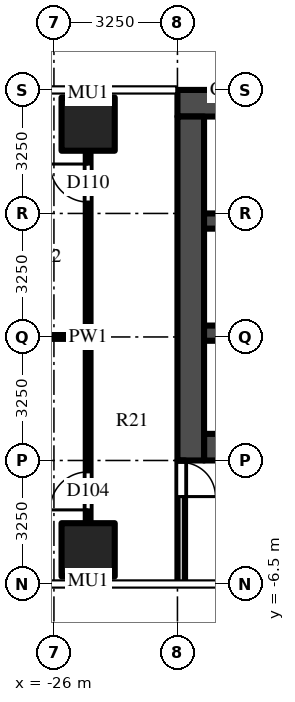
"""IFC4 building model, lengths in metres.
Left out: names, types, materials, properties, quantities, classifications, styles, units other than length and angle.
Written with IfcOpenShell. Run it as: python <this file> out.ifc"""

import sys

from ifc_helpers import new_model, si_unit, direction, frame, frame_2d, origin, origin_2d, place, context, subcontext, project, spatial, rectangle, extrude, source, transform, mapped, element, fill, save


model = new_model("IFC4")
c1 = context("Model", 3, precision=1e-05, world=origin(), true_north=direction((0.0, 1.0)))
c2 = subcontext(c1, "Body", "Model", "MODEL_VIEW")
j1 = project(units=[si_unit("LENGTHUNIT", "METRE"), si_unit("PLANEANGLEUNIT", "RADIAN")], contexts=[c1])
p1 = place(None, origin())
s1 = spatial("IfcSite", under=j1, at=p1, CompositionType="ELEMENT")
p2 = place(p1, origin())
s2 = spatial("IfcBuilding", under=s1, at=p2, CompositionType="ELEMENT")
p3 = place(p2, frame((0.0, 0.0, 61.0)))
s3 = spatial("IfcBuildingStorey", under=s2, at=p3, CompositionType="ELEMENT", Elevation=61.0)
m1 = source(origin(), c2, "Body", "SweptSolid", [
    extrude(rectangle(XDim=1.4, YDim=1.4, at=origin_2d()), origin(), (0.0, 0.0, 1.0), 4.5),
])
for number, where, z_axis, x_axis in (
    (1, (-25.1, -5.6, 0.0), (0.0, 0.0, 1.0), (1.0, 0.0, 0.0)),
    (2, (-25.1, 5.6, 0.0), (0.0, 0.0, 1.0), (1.0, 0.0, 0.0)),
):
    element("IfcColumn", number, at=place(p3, frame(where, z_axis=z_axis, x_axis=x_axis)), inside=s3, PredefinedType="COLUMN", context=c2, shape_type="MappedRepresentation", body=[
        mapped(m1, transform((0.0, 0.0, 0.0))),
    ])
m2 = source(origin(), c2, "Body", "SweptSolid", [
    extrude(rectangle(XDim=16.45, YDim=0.7, at=frame_2d((8.225, 0.0))), origin(), (0.0, 0.0, 1.0), 4.25),
])
p4 = place(p3, frame((-6.3, 6.15, 0.0), z_axis=(0.0, 0.0, 1.0), x_axis=(-1.0, 0.0, 0.0)))
e3 = element("IfcWall", 3, at=p4, inside=s3, PredefinedType="SHEAR", context=c2, shape_type="MappedRepresentation", body=[
    mapped(m2, transform((0.0, 0.0, 0.0))),
])
m3 = source(origin(), c2, "Body", "SweptSolid", [
    extrude(rectangle(XDim=14.85, YDim=0.7, at=frame_2d((7.425, 0.0))), origin(), (0.0, 0.0, 1.0), 4.25),
])
p5 = place(p3, frame((-7.2, -2.9, 0.0), z_axis=(0.0, 0.0, 1.0), x_axis=(-1.0, 0.0, 0.0)))
e4 = element("IfcWall", 4, at=p5, inside=s3, PredefinedType="SHEAR", context=c2, shape_type="MappedRepresentation", body=[
    mapped(m3, transform((0.0, 0.0, 0.0))),
])
m4 = source(origin(), c2, "Body", "SweptSolid", [
    extrude(rectangle(XDim=1.3, YDim=2.1, at=frame_2d((0.65, 1.05))), frame((0.0, 0.36, 0.0), z_axis=(0.0, -1.0, 0.0), x_axis=(1.0, 0.0, 0.0)), (0.0, 0.0, 1.0), 0.72),
])
p6 = place(p5, frame((12.2, 0.0, 0.0)))
e5 = element("IfcOpeningElement", 5, at=p6, cuts=e4, PredefinedType="OPENING", context=c2, shape_type="MappedRepresentation", body=[
    mapped(m4, transform((0.0, 0.0, 0.0))),
])
m5 = source(origin(), c2, "Body", "SweptSolid", [
    extrude(rectangle(XDim=1.2, YDim=2.1, at=frame_2d((0.6, 1.05))), frame((0.0, 0.36, 0.0), z_axis=(0.0, -1.0, 0.0), x_axis=(1.0, 0.0, 0.0)), (0.0, 0.0, 1.0), 0.72),
])
p7 = place(p5, frame((9.85, 0.0, 0.0)))
e6 = element("IfcOpeningElement", 6, at=p7, cuts=e4, PredefinedType="OPENING", context=c2, shape_type="MappedRepresentation", body=[
    mapped(m5, transform((0.0, 0.0, 0.0))),
])
m6 = source(origin(), c2, "Body", "SweptSolid", [
    extrude(rectangle(XDim=1.0, YDim=2.1, at=frame_2d((0.5, 1.05))), frame((0.0, 0.36, 0.0), z_axis=(0.0, -1.0, 0.0), x_axis=(1.0, 0.0, 0.0)), (0.0, 0.0, 1.0), 0.72),
])
p8 = place(p5, frame((7.9, 0.0, 0.0)))
e7 = element("IfcOpeningElement", 7, at=p8, cuts=e4, PredefinedType="OPENING", context=c2, shape_type="MappedRepresentation", body=[
    mapped(m6, transform((0.0, 0.0, 0.0))),
])
m7 = source(origin(), c2, "Body", "SweptSolid", [
    extrude(rectangle(XDim=0.9, YDim=2.1, at=frame_2d((0.45, 1.05))), frame((0.0, 0.36, 0.0), z_axis=(0.0, -1.0, 0.0), x_axis=(1.0, 0.0, 0.0)), (0.0, 0.0, 1.0), 0.72),
])
p9 = place(p5, frame((0.65, 0.0, 0.0)))
e8 = element("IfcOpeningElement", 8, at=p9, cuts=e4, PredefinedType="OPENING", context=c2, shape_type="MappedRepresentation", body=[
    mapped(m7, transform((0.0, 0.0, 0.0))),
])
p10 = place(p5, frame((3.2, 0.0, 0.0)))
e9 = element("IfcOpeningElement", 9, at=p10, cuts=e4, PredefinedType="OPENING", context=c2, shape_type="MappedRepresentation", body=[
    mapped(m6, transform((0.0, 0.0, 0.0))),
])
p11 = place(p5, frame((5.85, 0.0, 0.0)))
e10 = element("IfcOpeningElement", 10, at=p11, cuts=e4, PredefinedType="OPENING", context=c2, shape_type="MappedRepresentation", body=[
    mapped(m7, transform((0.0, 0.0, 0.0))),
])
m8 = source(origin(), c2, "Body", "SweptSolid", [
    extrude(rectangle(XDim=9.05, YDim=0.7, at=frame_2d((4.525, 0.0))), origin(), (0.0, 0.0, 1.0), 4.25),
])
p12 = place(p3, frame((-22.4, 5.8, 0.0), z_axis=(0.0, 0.0, 1.0), x_axis=(0.0, -1.0, 0.0)))
e11 = element("IfcWall", 11, at=p12, inside=s3, PredefinedType="SHEAR", context=c2, shape_type="MappedRepresentation", body=[
    mapped(m8, transform((0.0, 0.0, 0.0))),
])
m9 = source(origin(), c2, "Body", "SweptSolid", [
    extrude(rectangle(XDim=14.85, YDim=0.4, at=frame_2d((7.425, 0.0))), origin(), (0.0, 0.0, 1.0), 4.25),
])
p13 = place(p3, frame((-7.2, 0.1, 0.0), z_axis=(0.0, 0.0, 1.0), x_axis=(-1.0, 0.0, 0.0)))
e12 = element("IfcWall", 12, at=p13, inside=s3, PredefinedType="SHEAR", context=c2, shape_type="MappedRepresentation", body=[
    mapped(m9, transform((0.0, 0.0, 0.0))),
])
m10 = source(origin(), c2, "Body", "SweptSolid", [
    extrude(rectangle(XDim=1.0, YDim=2.1, at=frame_2d((0.5, 1.05))), frame((0.0, 0.21, 0.0), z_axis=(0.0, -1.0, 0.0), x_axis=(1.0, 0.0, 0.0)), (0.0, 0.0, 1.0), 0.42),
])
p14 = place(p13, frame((7.9, 0.0, 0.0)))
e13 = element("IfcOpeningElement", 13, at=p14, cuts=e12, PredefinedType="OPENING", context=c2, shape_type="MappedRepresentation", body=[
    mapped(m10, transform((0.0, 0.0, 0.0))),
])
m11 = source(origin(), c2, "Body", "SweptSolid", [
    extrude(rectangle(XDim=5.7, YDim=0.4, at=frame_2d((2.85, 0.0))), origin(), (0.0, 0.0, 1.0), 4.25),
])
p15 = place(p3, frame((-16.35, 3.05, 0.0), z_axis=(0.0, 0.0, 1.0), x_axis=(-1.0, 0.0, 0.0)))
e14 = element("IfcWall", 14, at=p15, inside=s3, PredefinedType="SHEAR", context=c2, shape_type="MappedRepresentation", body=[
    mapped(m11, transform((0.0, 0.0, 0.0))),
])
m12 = source(origin(), c2, "Body", "SweptSolid", [
    extrude(rectangle(XDim=3.25, YDim=0.2, at=frame_2d((1.625, 0.0))), origin(), (0.0, 0.0, 1.0), 4.25),
])
p16 = place(p3, frame((-22.65, -3.25, 0.0), z_axis=(0.0, 0.0, 1.0), x_axis=(0.0, -1.0, 0.0)))
e15 = element("IfcWall", 15, at=p16, inside=s3, PredefinedType="PARTITIONING", context=c2, shape_type="MappedRepresentation", body=[
    mapped(m12, transform((0.0, 0.0, 0.0))),
])
m13 = source(origin(), c2, "Body", "SweptSolid", [
    extrude(rectangle(XDim=0.9, YDim=2.1, at=frame_2d((0.45, 1.05))), frame((0.0, 0.11, 0.0), z_axis=(0.0, -1.0, 0.0), x_axis=(1.0, 0.0, 0.0)), (0.0, 0.0, 1.0), 0.22),
])
p17 = place(p16, frame((0.05, 0.0, 0.0)))
e16 = element("IfcOpeningElement", 16, at=p17, cuts=e15, PredefinedType="OPENING", context=c2, shape_type="MappedRepresentation", body=[
    mapped(m13, transform((0.0, 0.0, 0.0))),
])
m14 = source(origin(), c2, "Body", "SweptSolid", [
    extrude(rectangle(XDim=9.8, YDim=0.125, at=frame_2d((4.9, 0.0))), origin(), (0.0, 0.0, 1.0), 3.468),
])
p18 = place(p3, frame((-25.1, -4.9, 0.0), z_axis=(0.0, 0.0, 1.0), x_axis=(0.0, 1.0, 0.0)))
e17 = element("IfcWall", 17, at=p18, inside=s3, PredefinedType="PARTITIONING", context=c2, shape_type="MappedRepresentation", body=[
    mapped(m14, transform((0.0, 0.0, 0.0))),
])
m15 = source(origin(), c2, "Body", "SweptSolid", [
    extrude(rectangle(XDim=1.0, YDim=2.1, at=frame_2d((0.5, 1.05))), frame((0.0, 0.073, 0.0), z_axis=(0.0, -1.0, 0.0), x_axis=(1.0, 0.0, 0.0)), (0.0, 0.0, 1.0), 0.145),
])
p19 = place(p18, frame((0.35, 0.0, 0.0)))
e18 = element("IfcOpeningElement", 18, at=p19, cuts=e17, PredefinedType="OPENING", context=c2, shape_type="MappedRepresentation", body=[
    mapped(m15, transform((0.0, 0.0, 0.0))),
])
p20 = place(p18, frame((8.45, 0.0, 0.0)))
e19 = element("IfcOpeningElement", 19, at=p20, cuts=e17, PredefinedType="OPENING", context=c2, shape_type="MappedRepresentation", body=[
    mapped(m15, transform((0.0, 0.0, 0.0))),
])
m16 = source(origin(), c2, "Body", "SweptSolid", [
    extrude(rectangle(XDim=7.137, YDim=0.1, at=frame_2d((3.569, 0.0))), origin(), (0.0, 0.0, 1.0), 3.33),
])
p21 = place(p3, frame((-32.3, 0.0, 0.0), z_axis=(0.0, 0.0, 1.0), x_axis=(1.0, 0.0, 0.0)))
e20 = element("IfcWall", 20, at=p21, inside=s3, PredefinedType="PARTITIONING", context=c2, shape_type="MappedRepresentation", body=[
    mapped(m16, transform((0.0, 0.0, 0.0))),
])
m17 = source(origin(), c2, "Body", "SweptSolid", [
    extrude(rectangle(XDim=0.9, YDim=2.1, at=frame_2d((0.45, 1.05))), frame((0.0, 0.025, 0.0), z_axis=(0.0, -1.0, 0.0), x_axis=(1.0, 0.0, 0.0)), (0.0, 0.0, 1.0), 0.05),
])
p22 = place(p17, origin())
e21 = element("IfcDoor", 21, at=p22, inside=s3, OperationType="SINGLE_SWING_RIGHT", PredefinedType="DOOR", context=c2, shape_type="MappedRepresentation", body=[
    mapped(m17, transform((0.0, 0.0, 0.0))),
])
fill(e16, e21)
m18 = source(origin(), c2, "Body", "SweptSolid", [
    extrude(rectangle(XDim=1.0, YDim=2.1, at=frame_2d((0.5, 1.05))), frame((0.0, 0.025, 0.0), z_axis=(0.0, -1.0, 0.0), x_axis=(1.0, 0.0, 0.0)), (0.0, 0.0, 1.0), 0.05),
])
p23 = place(p19, origin())
e22 = element("IfcDoor", 22, at=p23, inside=s3, OperationType="SINGLE_SWING_LEFT", PredefinedType="DOOR", context=c2, shape_type="MappedRepresentation", body=[
    mapped(m18, transform((0.0, 0.0, 0.0))),
])
fill(e18, e22)
p24 = place(p20, origin())
e23 = element("IfcDoor", 23, at=p24, inside=s3, OperationType="SINGLE_SWING_RIGHT", PredefinedType="DOOR", context=c2, shape_type="MappedRepresentation", body=[
    mapped(m18, transform((0.0, 0.0, 0.0))),
])
fill(e19, e23)
save(model, sys.argv[1])
